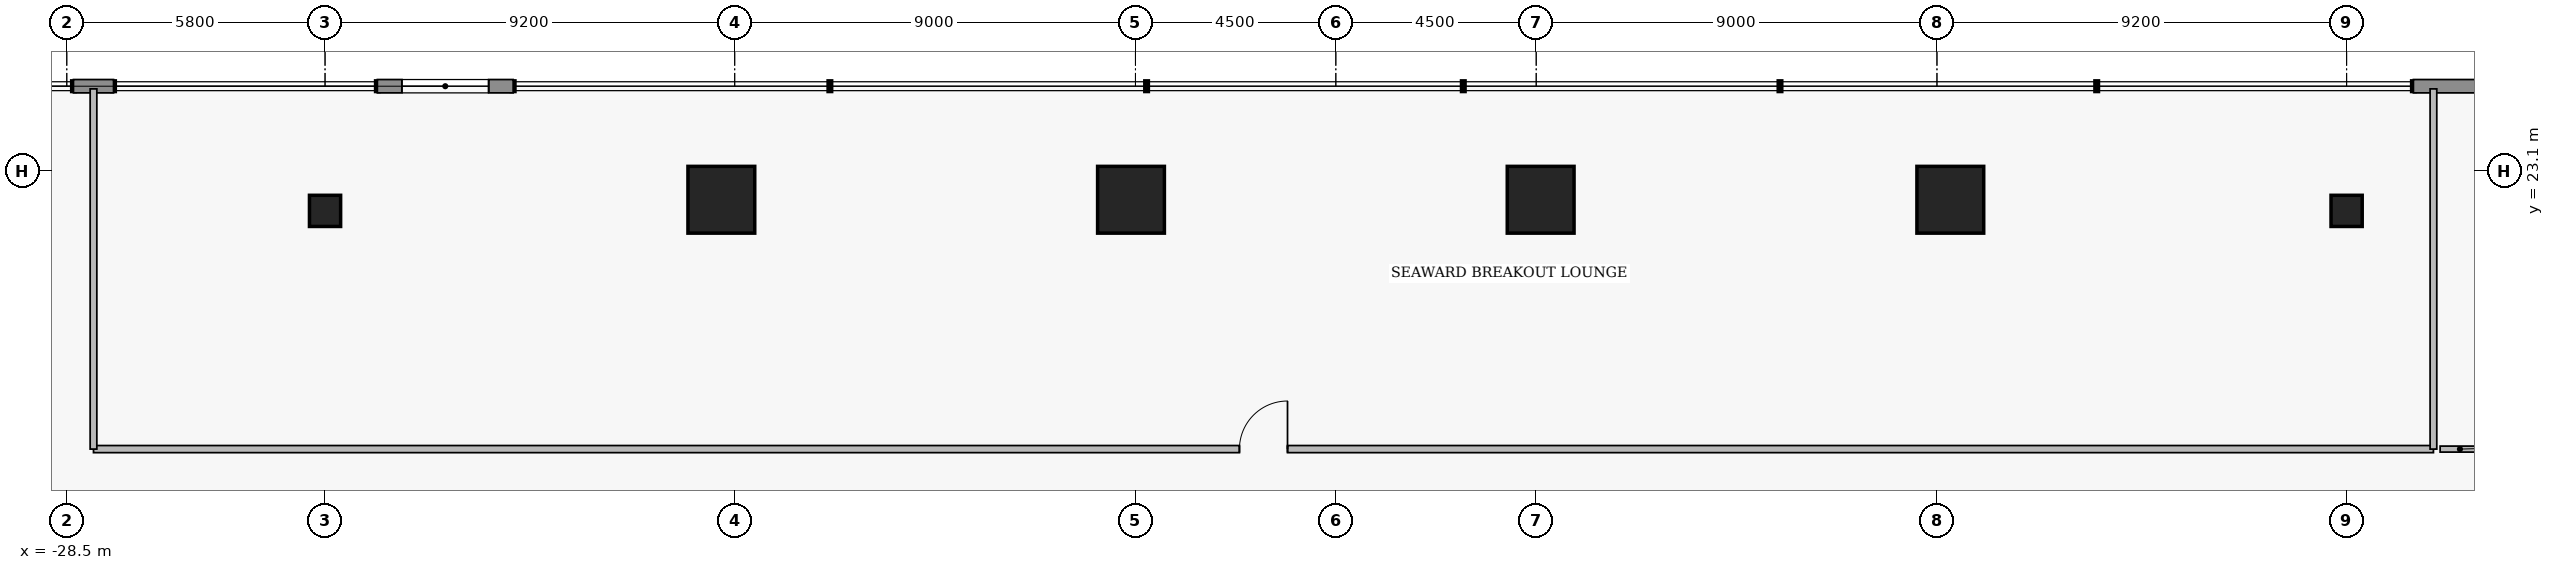
"""IFC4 building model, lengths in metres.
Left out: names, types, materials, properties, quantities, classifications, styles, units other than length and angle.
Written with IfcOpenShell. Run it as: python <this file> out.ifc"""

import sys

from ifc_helpers import new_model, si_unit, direction, frame, frame_2d, origin, origin_2d, place, context, subcontext, project, spatial, rectangle, extrude, element, fill, save


model = new_model("IFC4")
c1 = context("Model", 3, precision=1e-05, world=origin(), true_north=direction((0.0, 1.0)))
c2 = subcontext(c1, "Body", "Model", "MODEL_VIEW")
j1 = project(units=[si_unit("LENGTHUNIT", "METRE"), si_unit("PLANEANGLEUNIT", "RADIAN")], contexts=[c1])
p1 = place(None, origin())
s1 = spatial("IfcSite", under=j1, at=p1, CompositionType="ELEMENT")
p2 = place(p1, origin())
s2 = spatial("IfcBuilding", under=s1, at=p2, CompositionType="ELEMENT")
p3 = place(p2, frame((0.0, 0.0, 18.0)))
s3 = spatial("IfcBuildingStorey", under=s2, at=p3, CompositionType="ELEMENT", Elevation=18.0)
for number, where, z_axis, x_axis in (
    (1, (-13.8, 22.45, 0.0), (0.0, 0.0, 1.0), (1.0, 0.0, 0.0)),
    (2, (-4.6, 22.45, 0.0), (0.0, 0.0, 1.0), (1.0, 0.0, 0.0)),
    (3, (4.6, 22.45, 0.0), (0.0, 0.0, 1.0), (1.0, 0.0, 0.0)),
    (4, (13.8, 22.45, 0.0), (0.0, 0.0, 1.0), (1.0, 0.0, 0.0)),
):
    element("IfcColumn", number, at=place(p3, frame(where, z_axis=z_axis, x_axis=x_axis)), inside=s3, PredefinedType="COLUMN", context=c2, shape_type="SweptSolid", body=[
        extrude(rectangle(XDim=1.5, YDim=1.5, at=origin_2d()), origin(), (0.0, 0.0, 1.0), 4.8),
    ])
for number, where, z_axis, x_axis in (
    (5, (-22.7, 22.2, 0.0), (0.0, 0.0, 1.0), (1.0, 0.0, 0.0)),
    (6, (22.7, 22.2, 0.0), (0.0, 0.0, 1.0), (1.0, 0.0, 0.0)),
):
    element("IfcColumn", number, at=place(p3, frame(where, z_axis=z_axis, x_axis=x_axis)), inside=s3, PredefinedType="COLUMN", context=c2, shape_type="SweptSolid", body=[
        extrude(rectangle(XDim=0.7, YDim=0.7, at=origin_2d()), origin(), (0.0, 0.0, 1.0), 4.8),
    ])
p4 = place(p3, frame((-28.35, 25.0, 0.0), z_axis=(0.0, 0.0, 1.0), x_axis=(1.0, 0.0, 0.0)))
e7 = element("IfcWall", 7, at=p4, inside=s3, PredefinedType="STANDARD", context=c2, shape_type="SweptSolid", body=[
    extrude(rectangle(XDim=0.9, YDim=0.3, at=frame_2d((0.45, 0.0))), origin(), (0.0, 0.0, 1.0), 4.54),
])
p5 = place(p3, frame((-21.525, 25.0, 0.0), z_axis=(0.0, 0.0, 1.0), x_axis=(1.0, 0.0, 0.0)))
e8 = element("IfcWall", 8, at=p5, inside=s3, PredefinedType="STANDARD", context=c2, shape_type="SweptSolid", body=[
    extrude(rectangle(XDim=3.05, YDim=0.3, at=frame_2d((1.525, 0.0))), origin(), (0.0, 0.0, 1.0), 4.54),
])
p6 = place(p5, frame((0.55, 0.0, 0.9)))
e9 = element("IfcOpeningElement", 9, at=p6, cuts=e8, PredefinedType="OPENING", context=c2, shape_type="SweptSolid", body=[
    extrude(rectangle(XDim=1.95, YDim=2.05, at=frame_2d((0.975, 1.025))), frame((0.0, 0.16, 0.0), z_axis=(0.0, -1.0, 0.0), x_axis=(1.0, 0.0, 0.0)), (0.0, 0.0, 1.0), 0.32),
])
p7 = place(p3, frame((24.2, 25.0, 0.0), z_axis=(0.0, 0.0, 1.0), x_axis=(1.0, 0.0, 0.0)))
e10 = element("IfcWall", 10, at=p7, inside=s3, PredefinedType="STANDARD", context=c2, shape_type="SweptSolid", body=[
    extrude(rectangle(XDim=7.8, YDim=0.3, at=frame_2d((3.9, 0.0))), origin(), (0.0, 0.0, 1.0), 4.54),
])
p8 = place(p3, frame((-27.9, 16.85, 0.0), z_axis=(0.0, 0.0, 1.0), x_axis=(1.0, 0.0, 0.0)))
e11 = element("IfcWall", 11, at=p8, inside=s3, PredefinedType="PARTITIONING", context=c2, shape_type="SweptSolid", body=[
    extrude(rectangle(XDim=52.55, YDim=0.16, at=frame_2d((26.275, 0.0))), origin(), (0.0, 0.0, 1.0), 4.007),
])
p9 = place(p8, frame((25.735, 0.0, 0.0)))
e12 = element("IfcOpeningElement", 12, at=p9, cuts=e11, PredefinedType="OPENING", context=c2, shape_type="SweptSolid", body=[
    extrude(rectangle(XDim=1.08, YDim=2.18, at=frame_2d((0.54, 1.09))), frame((0.0, 0.09, 0.0), z_axis=(0.0, -1.0, 0.0), x_axis=(1.0, 0.0, 0.0)), (0.0, 0.0, 1.0), 0.18),
])
p10 = place(p3, frame((24.8, 16.85, 0.0), z_axis=(0.0, 0.0, 1.0), x_axis=(1.0, 0.0, 0.0)))
e13 = element("IfcWall", 13, at=p10, inside=s3, PredefinedType="PLUMBINGWALL", context=c2, shape_type="SweptSolid", body=[
    extrude(rectangle(XDim=2.7, YDim=0.135, at=frame_2d((1.35, 0.0))), origin(), (0.0, 0.0, 1.0), 4.54),
])
p11 = place(p10, frame((0.89, 0.0, 0.0)))
e14 = element("IfcOpeningElement", 14, at=p11, cuts=e13, PredefinedType="OPENING", context=c2, shape_type="SweptSolid", body=[
    extrude(rectangle(XDim=0.92, YDim=2.12, at=frame_2d((0.46, 1.06))), frame((0.0, 0.077, 0.0), z_axis=(0.0, -1.0, 0.0), x_axis=(1.0, 0.0, 0.0)), (0.0, 0.0, 1.0), 0.155),
])
for number, where, z_axis, x_axis in (
    (15, (-27.9, 16.85, 0.0), (0.0, 0.0, 1.0), (0.0, 1.0, 0.0)),
    (16, (24.65, 16.85, 0.0), (0.0, 0.0, 1.0), (0.0, 1.0, 0.0)),
):
    element("IfcWall", number, at=place(p3, frame(where, z_axis=z_axis, x_axis=x_axis)), inside=s3, PredefinedType="PARTITIONING", context=c2, shape_type="SweptSolid", body=[
        extrude(rectangle(XDim=8.09, YDim=0.15, at=frame_2d((4.045, 0.0))), origin(), (0.0, 0.0, 1.0), 4.54),
    ])
p12 = place(p6, origin())
e17 = element("IfcWindow", 17, at=p12, inside=s3, PartitioningType="SINGLE_PANEL", PredefinedType="WINDOW", context=c2, shape_type="SweptSolid", body=[
    extrude(rectangle(XDim=1.95, YDim=2.05, at=frame_2d((0.975, 1.025))), frame((0.0, 0.03, 0.0), z_axis=(0.0, -1.0, 0.0), x_axis=(1.0, 0.0, 0.0)), (0.0, 0.0, 1.0), 0.06),
])
fill(e9, e17)
p13 = place(p9, origin())
e18 = element("IfcDoor", 18, at=p13, inside=s3, OperationType="SINGLE_SWING_RIGHT", PredefinedType="DOOR", context=c2, shape_type="SweptSolid", body=[
    extrude(rectangle(XDim=1.08, YDim=2.18, at=frame_2d((0.54, 1.09))), frame((0.0, 0.025, 0.0), z_axis=(0.0, -1.0, 0.0), x_axis=(1.0, 0.0, 0.0)), (0.0, 0.0, 1.0), 0.05),
])
fill(e12, e18)
save(model, sys.argv[1])
